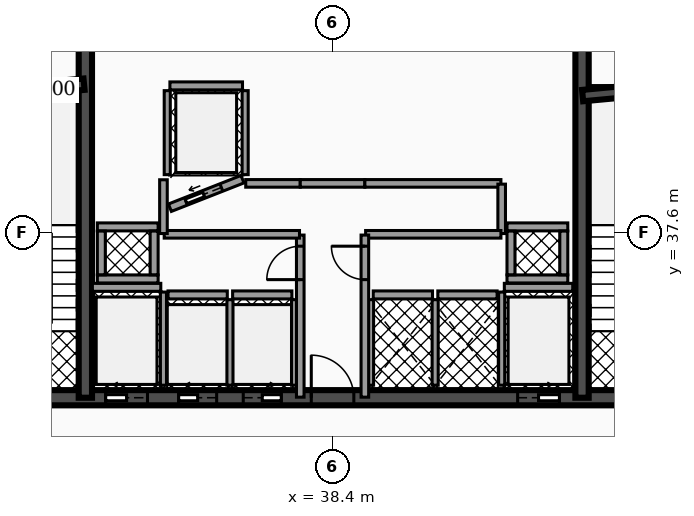
"""IFC4 building model, lengths in metres.
Left out: names, types, materials, properties, quantities, classifications, styles, units other than length and angle.
Written with IfcOpenShell. Run it as: python <this file> out.ifc"""

import sys

from ifc_helpers import new_model, si_unit, direction, frame, frame_2d, origin, place, context, subcontext, project, spatial, rectangle, extrude, element, fill, save


model = new_model("IFC4")
c1 = context("Model", 3, precision=1e-05, world=origin(), true_north=direction((0.0, 1.0)))
c2 = subcontext(c1, "Body", "Model", "MODEL_VIEW")
j1 = project(units=[si_unit("LENGTHUNIT", "METRE"), si_unit("PLANEANGLEUNIT", "RADIAN")], contexts=[c1])
p1 = place(None, origin())
s1 = spatial("IfcSite", under=j1, at=p1, CompositionType="ELEMENT")
p2 = place(p1, origin())
s2 = spatial("IfcBuilding", under=s1, at=p2, CompositionType="ELEMENT")
p3 = place(p2, frame((0.0, 0.0, 183.26)))
s3 = spatial("IfcBuildingStorey", under=s2, at=p3, CompositionType="ELEMENT", Elevation=183.26)
p4 = place(p3, frame((28.4, 33.25, 0.0), z_axis=(0.0, 0.0, 1.0), x_axis=(1.0, 0.0, 0.0)))
e1 = element("IfcWall", 1, at=p4, inside=s3, PredefinedType="SHEAR", context=c2, shape_type="SweptSolid", body=[
    extrude(rectangle(XDim=20.06, YDim=0.4, at=frame_2d((10.03, 0.0))), origin(), (0.0, 0.0, 1.0), 3.5),
])
p5 = place(p4, frame((4.03, 0.0, 0.0)))
e2 = element("IfcOpeningElement", 2, at=p5, cuts=e1, PredefinedType="OPENING", context=c2, shape_type="SweptSolid", body=[
    extrude(rectangle(XDim=1.1, YDim=2.15, at=frame_2d((0.55, 1.075))), frame((0.0, 0.21, 0.0), z_axis=(0.0, -1.0, 0.0), x_axis=(1.0, 0.0, 0.0)), (0.0, 0.0, 1.0), 0.42),
])
p6 = place(p4, frame((14.87, 0.0, 0.0)))
e3 = element("IfcOpeningElement", 3, at=p6, cuts=e1, PredefinedType="OPENING", context=c2, shape_type="SweptSolid", body=[
    extrude(rectangle(XDim=1.1, YDim=2.15, at=frame_2d((0.55, 1.075))), frame((0.0, 0.21, 0.0), z_axis=(0.0, -1.0, 0.0), x_axis=(1.0, 0.0, 0.0)), (0.0, 0.0, 1.0), 0.42),
])
p7 = place(p4, frame((5.95, 0.0, 0.0)))
e4 = element("IfcOpeningElement", 4, at=p7, cuts=e1, PredefinedType="OPENING", context=c2, shape_type="SweptSolid", body=[
    extrude(rectangle(XDim=1.0, YDim=2.1, at=frame_2d((0.5, 1.05))), frame((0.0, 0.21, 0.0), z_axis=(0.0, -1.0, 0.0), x_axis=(1.0, 0.0, 0.0)), (0.0, 0.0, 1.0), 0.42),
])
p8 = place(p4, frame((7.65, 0.0, 0.0)))
e5 = element("IfcOpeningElement", 5, at=p8, cuts=e1, PredefinedType="OPENING", context=c2, shape_type="SweptSolid", body=[
    extrude(rectangle(XDim=1.0, YDim=2.1, at=frame_2d((0.5, 1.05))), frame((0.0, 0.21, 0.0), z_axis=(0.0, -1.0, 0.0), x_axis=(1.0, 0.0, 0.0)), (0.0, 0.0, 1.0), 0.42),
])
p9 = place(p4, frame((1.31, 0.0, 0.0)))
e6 = element("IfcOpeningElement", 6, at=p9, cuts=e1, PredefinedType="OPENING", context=c2, shape_type="SweptSolid", body=[
    extrude(rectangle(XDim=1.1, YDim=2.2, at=frame_2d((0.55, 1.1))), frame((0.0, 0.21, 0.0), z_axis=(0.0, -1.0, 0.0), x_axis=(1.0, 0.0, 0.0)), (0.0, 0.0, 1.0), 0.42),
])
p10 = place(p4, frame((9.44, 0.0, 0.0)))
e7 = element("IfcOpeningElement", 7, at=p10, cuts=e1, PredefinedType="OPENING", context=c2, shape_type="SweptSolid", body=[
    extrude(rectangle(XDim=1.12, YDim=2.05, at=frame_2d((0.56, 1.025))), frame((0.0, 0.21, 0.0), z_axis=(0.0, -1.0, 0.0), x_axis=(1.0, 0.0, 0.0)), (0.0, 0.0, 1.0), 0.42),
])
p11 = place(p4, frame((17.65, 0.0, 0.0)))
e8 = element("IfcOpeningElement", 8, at=p11, cuts=e1, PredefinedType="OPENING", context=c2, shape_type="SweptSolid", body=[
    extrude(rectangle(XDim=1.1, YDim=2.2, at=frame_2d((0.55, 1.1))), frame((0.0, 0.21, 0.0), z_axis=(0.0, -1.0, 0.0), x_axis=(1.0, 0.0, 0.0)), (0.0, 0.0, 1.0), 0.42),
])
for number, where, z_axis, x_axis in (
    (9, (31.895, 33.25, 0.0), (0.0, 0.0, 1.0), (0.0, 1.0, 0.0)),
    (10, (44.965, 33.25, 0.0), (0.0, 0.0, 1.0), (0.0, 1.0, 0.0)),
):
    element("IfcWall", number, at=place(p3, frame(where, z_axis=z_axis, x_axis=x_axis)), inside=s3, PredefinedType="SHEAR", context=c2, shape_type="SweptSolid", body=[
        extrude(rectangle(XDim=10.2, YDim=0.35, at=frame_2d((5.1, 0.0))), origin(), (0.0, 0.0, 1.0), 3.5),
    ])
p12 = place(p3, frame((28.64, 41.2, 0.0), z_axis=(0.0, 0.0, 1.0), x_axis=(0.995687118776, 0.092774789157, 0.0)))
e11 = element("IfcWall", 11, at=p12, inside=s3, PredefinedType="SHEAR", context=c2, shape_type="SweptSolid", body=[
    extrude(rectangle(XDim=3.234, YDim=0.3, at=frame_2d((1.617, 0.0))), origin(), (0.0, 0.0, 1.0), 3.5),
])
p13 = place(p3, frame((44.98, 41.2, 0.0), z_axis=(0.0, 0.0, 1.0), x_axis=(0.995686468965, 0.09278176286, 0.0)))
e12 = element("IfcWall", 12, at=p13, inside=s3, PredefinedType="SHEAR", context=c2, shape_type="SweptSolid", body=[
    extrude(rectangle(XDim=3.234, YDim=0.3, at=frame_2d((1.617, 0.0))), origin(), (0.0, 0.0, 1.0), 3.5),
])
p14 = place(p3, frame((32.08, 36.155, 0.0), z_axis=(0.0, 0.0, 1.0), x_axis=(1.0, 0.0, 0.0)))
e13 = element("IfcWall", 13, at=p14, inside=s3, PredefinedType="SOLIDWALL", context=c2, shape_type="SweptSolid", body=[
    extrude(rectangle(XDim=1.8, YDim=0.21, at=frame_2d((0.9, 0.0))), origin(), (0.0, 0.0, 1.0), 2.472),
])
p15 = place(p3, frame((33.95, 33.58, 0.0), z_axis=(0.0, 0.0, 1.0), x_axis=(0.0, 1.0, 0.0)))
e14 = element("IfcWall", 14, at=p15, inside=s3, PredefinedType="SOLIDWALL", context=c2, shape_type="SweptSolid", body=[
    extrude(rectangle(XDim=2.45, YDim=0.16, at=frame_2d((1.225, 0.0))), origin(), (0.0, 0.0, 1.0), 2.472),
])
p16 = place(p3, frame((42.92, 36.155, 0.0), z_axis=(0.0, 0.0, 1.0), x_axis=(1.0, 0.0, 0.0)))
e15 = element("IfcWall", 15, at=p16, inside=s3, PredefinedType="SOLIDWALL", context=c2, shape_type="SweptSolid", body=[
    extrude(rectangle(XDim=1.8, YDim=0.21, at=frame_2d((0.9, 0.0))), origin(), (0.0, 0.0, 1.0), 2.472),
])
p17 = place(p3, frame((42.85, 33.58, 0.0), z_axis=(0.0, 0.0, 1.0), x_axis=(0.0, 1.0, 0.0)))
e16 = element("IfcWall", 16, at=p17, inside=s3, PredefinedType="SOLIDWALL", context=c2, shape_type="SweptSolid", body=[
    extrude(rectangle(XDim=2.45, YDim=0.16, at=frame_2d((1.225, 0.0))), origin(), (0.0, 0.0, 1.0), 2.472),
])
p18 = place(p3, frame((34.07, 35.955, 0.0), z_axis=(0.0, 0.0, 1.0), x_axis=(1.0, 0.0, 0.0)))
e17 = element("IfcWall", 17, at=p18, inside=s3, PredefinedType="SOLIDWALL", context=c2, shape_type="SweptSolid", body=[
    extrude(rectangle(XDim=1.56, YDim=0.21, at=frame_2d((0.78, 0.0))), origin(), (0.0, 0.0, 1.0), 2.472),
])
p19 = place(p3, frame((35.7, 33.58, 0.0), z_axis=(0.0, 0.0, 1.0), x_axis=(0.0, 1.0, 0.0)))
e18 = element("IfcWall", 18, at=p19, inside=s3, PredefinedType="SOLIDWALL", context=c2, shape_type="SweptSolid", body=[
    extrude(rectangle(XDim=2.25, YDim=0.16, at=frame_2d((1.125, 0.0))), origin(), (0.0, 0.0, 1.0), 2.472),
])
p20 = place(p3, frame((35.77, 35.955, 0.0), z_axis=(0.0, 0.0, 1.0), x_axis=(1.0, 0.0, 0.0)))
e19 = element("IfcWall", 19, at=p20, inside=s3, PredefinedType="SOLIDWALL", context=c2, shape_type="SweptSolid", body=[
    extrude(rectangle(XDim=1.56, YDim=0.21, at=frame_2d((0.78, 0.0))), origin(), (0.0, 0.0, 1.0), 2.472),
])
p21 = place(p3, frame((37.4, 33.58, 0.0), z_axis=(0.0, 0.0, 1.0), x_axis=(0.0, 1.0, 0.0)))
e20 = element("IfcWall", 20, at=p21, inside=s3, PredefinedType="SOLIDWALL", context=c2, shape_type="SweptSolid", body=[
    extrude(rectangle(XDim=2.25, YDim=0.16, at=frame_2d((1.125, 0.0))), origin(), (0.0, 0.0, 1.0), 2.472),
])
p22 = place(p3, frame((34.12, 38.25, 0.0), z_axis=(0.0, 0.0, 1.0), x_axis=(0.930804993012, 0.36551616241, 0.0)))
e21 = element("IfcWall", 21, at=p22, inside=s3, PredefinedType="SOLIDWALL", context=c2, shape_type="SweptSolid", body=[
    extrude(rectangle(XDim=2.052, YDim=0.21, at=frame_2d((1.026, 0.0))), origin(), (0.0, 0.0, 1.0), 2.472),
])
p23 = place(p22, frame((0.455, 0.0, 0.0)))
e22 = element("IfcOpeningElement", 22, at=p23, cuts=e21, PredefinedType="OPENING", context=c2, shape_type="SweptSolid", body=[
    extrude(rectangle(XDim=1.0, YDim=2.1, at=frame_2d((0.5, 1.05))), frame((0.0, 0.115, 0.0), z_axis=(0.0, -1.0, 0.0), x_axis=(1.0, 0.0, 0.0)), (0.0, 0.0, 1.0), 0.23),
])
p24 = place(p3, frame((34.12, 41.455, 0.0), z_axis=(0.0, 0.0, 1.0), x_axis=(1.0, 0.0, 0.0)))
e23 = element("IfcWall", 23, at=p24, inside=s3, PredefinedType="SOLIDWALL", context=c2, shape_type="SweptSolid", body=[
    extrude(rectangle(XDim=1.91, YDim=0.21, at=frame_2d((0.955, 0.0))), origin(), (0.0, 0.0, 1.0), 2.472),
])
for number, where, z_axis, x_axis in (
    (24, (34.05, 39.12, 0.0), (0.0, 0.0, 1.0), (0.0, 1.0, 0.0)),
    (25, (36.1, 39.12, 0.0), (0.0, 0.0, 1.0), (0.0, 1.0, 0.0)),
):
    element("IfcWall", number, at=place(p3, frame(where, z_axis=z_axis, x_axis=x_axis)), inside=s3, PredefinedType="SOLIDWALL", context=c2, shape_type="SweptSolid", body=[
        extrude(rectangle(XDim=2.21, YDim=0.16, at=frame_2d((1.105, 0.0))), origin(), (0.0, 0.0, 1.0), 2.472),
    ])
p25 = place(p3, frame((39.47, 35.955, 0.0), z_axis=(0.0, 0.0, 1.0), x_axis=(1.0, 0.0, 0.0)))
e26 = element("IfcWall", 26, at=p25, inside=s3, PredefinedType="SOLIDWALL", context=c2, shape_type="SweptSolid", body=[
    extrude(rectangle(XDim=1.56, YDim=0.21, at=frame_2d((0.78, 0.0))), origin(), (0.0, 0.0, 1.0), 2.472),
])
for number, where, z_axis, x_axis in (
    (27, (39.4, 33.58, 0.0), (0.0, 0.0, 1.0), (0.0, 1.0, 0.0)),
    (28, (41.1, 33.58, 0.0), (0.0, 0.0, 1.0), (0.0, 1.0, 0.0)),
):
    element("IfcWall", number, at=place(p3, frame(where, z_axis=z_axis, x_axis=x_axis)), inside=s3, PredefinedType="SOLIDWALL", context=c2, shape_type="SweptSolid", body=[
        extrude(rectangle(XDim=2.25, YDim=0.16, at=frame_2d((1.125, 0.0))), origin(), (0.0, 0.0, 1.0), 2.472),
    ])
p26 = place(p3, frame((41.17, 35.955, 0.0), z_axis=(0.0, 0.0, 1.0), x_axis=(1.0, 0.0, 0.0)))
e29 = element("IfcWall", 29, at=p26, inside=s3, PredefinedType="SOLIDWALL", context=c2, shape_type="SweptSolid", body=[
    extrude(rectangle(XDim=1.56, YDim=0.21, at=frame_2d((0.78, 0.0))), origin(), (0.0, 0.0, 1.0), 2.472),
])
for number, where, z_axis, x_axis in (
    (30, (32.21, 36.375, 0.0), (0.0, 0.0, 1.0), (1.0, 0.0, 0.0)),
    (31, (32.21, 37.745, 0.0), (0.0, 0.0, 1.0), (1.0, 0.0, 0.0)),
):
    element("IfcWall", number, at=place(p3, frame(where, z_axis=z_axis, x_axis=x_axis)), inside=s3, PredefinedType="SOLIDWALL", context=c2, shape_type="SweptSolid", body=[
        extrude(rectangle(XDim=1.6, YDim=0.21, at=frame_2d((0.8, 0.0))), origin(), (0.0, 0.0, 1.0), 3.5),
    ])
for number, where, z_axis, x_axis in (
    (32, (32.315, 36.485, 0.0), (0.0, 0.0, 1.0), (0.0, 1.0, 0.0)),
    (33, (33.705, 36.485, 0.0), (0.0, 0.0, 1.0), (0.0, 1.0, 0.0)),
):
    element("IfcWall", number, at=place(p3, frame(where, z_axis=z_axis, x_axis=x_axis)), inside=s3, PredefinedType="SOLIDWALL", context=c2, shape_type="SweptSolid", body=[
        extrude(rectangle(XDim=1.15, YDim=0.21, at=frame_2d((0.575, 0.0))), origin(), (0.0, 0.0, 1.0), 3.5),
    ])
for number, where, z_axis, x_axis in (
    (34, (42.99, 36.375, 0.0), (0.0, 0.0, 1.0), (1.0, 0.0, 0.0)),
    (35, (42.99, 37.745, 0.0), (0.0, 0.0, 1.0), (1.0, 0.0, 0.0)),
):
    element("IfcWall", number, at=place(p3, frame(where, z_axis=z_axis, x_axis=x_axis)), inside=s3, PredefinedType="SOLIDWALL", context=c2, shape_type="SweptSolid", body=[
        extrude(rectangle(XDim=1.6, YDim=0.21, at=frame_2d((0.8, 0.0))), origin(), (0.0, 0.0, 1.0), 3.5),
    ])
for number, where, z_axis, x_axis in (
    (36, (43.095, 36.485, 0.0), (0.0, 0.0, 1.0), (0.0, 1.0, 0.0)),
    (37, (44.485, 36.485, 0.0), (0.0, 0.0, 1.0), (0.0, 1.0, 0.0)),
):
    element("IfcWall", number, at=place(p3, frame(where, z_axis=z_axis, x_axis=x_axis)), inside=s3, PredefinedType="SOLIDWALL", context=c2, shape_type="SweptSolid", body=[
        extrude(rectangle(XDim=1.15, YDim=0.21, at=frame_2d((0.575, 0.0))), origin(), (0.0, 0.0, 1.0), 3.5),
    ])
p27 = place(p3, frame((37.55, 33.265, 0.0), z_axis=(0.0, 0.0, 1.0), x_axis=(0.0, 1.0, 0.0)))
e38 = element("IfcWall", 38, at=p27, inside=s3, PredefinedType="PARTITIONING", context=c2, shape_type="SweptSolid", body=[
    extrude(rectangle(XDim=4.265, YDim=0.2, at=frame_2d((2.133, 0.0))), origin(), (0.0, 0.0, 1.0), 2.457),
])
p28 = place(p27, frame((3.093, 0.0, 0.0)))
e39 = element("IfcOpeningElement", 39, at=p28, cuts=e38, PredefinedType="OPENING", context=c2, shape_type="SweptSolid", body=[
    extrude(rectangle(XDim=0.88, YDim=2.05, at=frame_2d((0.44, 1.025))), frame((0.0, 0.11, 0.0), z_axis=(0.0, -1.0, 0.0), x_axis=(1.0, 0.0, 0.0)), (0.0, 0.0, 1.0), 0.22),
])
p29 = place(p3, frame((33.97, 37.55, 0.0), z_axis=(0.0, 0.0, 1.0), x_axis=(1.0, 0.0, 0.0)))
e40 = element("IfcWall", 40, at=p29, inside=s3, PredefinedType="PARTITIONING", context=c2, shape_type="SweptSolid", body=[
    extrude(rectangle(XDim=3.56, YDim=0.2, at=frame_2d((1.78, 0.0))), origin(), (0.0, 0.0, 1.0), 2.457),
])
p30 = place(p3, frame((33.95, 37.57, 0.0), z_axis=(0.0, 0.0, 1.0), x_axis=(0.0, 1.0, 0.0)))
e41 = element("IfcWall", 41, at=p30, inside=s3, PredefinedType="PARTITIONING", context=c2, shape_type="SweptSolid", body=[
    extrude(rectangle(XDim=1.415, YDim=0.2, at=frame_2d((0.708, 0.0))), origin(), (0.0, 0.0, 1.0), 2.457),
])
p31 = place(p3, frame((36.115, 38.89, 0.0), z_axis=(0.0, 0.0, 1.0), x_axis=(1.0, 0.0, 0.0)))
e42 = element("IfcWall", 42, at=p31, inside=s3, PredefinedType="PARTITIONING", context=c2, shape_type="SweptSolid", body=[
    extrude(rectangle(XDim=1.435, YDim=0.2, at=frame_2d((0.718, 0.0))), origin(), (0.0, 0.0, 1.0), 2.457),
])
p32 = place(p3, frame((37.55, 38.89, 0.0), z_axis=(0.0, 0.0, 1.0), x_axis=(1.0, 0.0, 0.0)))
e43 = element("IfcWall", 43, at=p32, inside=s3, PredefinedType="PARTITIONING", context=c2, shape_type="SweptSolid", body=[
    extrude(rectangle(XDim=1.7, YDim=0.2, at=frame_2d((0.85, 0.0))), origin(), (0.0, 0.0, 1.0), 2.457),
])
p33 = place(p3, frame((39.25, 38.89, 0.0), z_axis=(0.0, 0.0, 1.0), x_axis=(1.0, 0.0, 0.0)))
e44 = element("IfcWall", 44, at=p33, inside=s3, PredefinedType="PARTITIONING", context=c2, shape_type="SweptSolid", body=[
    extrude(rectangle(XDim=3.58, YDim=0.2, at=frame_2d((1.79, 0.0))), origin(), (0.0, 0.0, 1.0), 2.457),
])
p34 = place(p3, frame((42.85, 37.57, 0.0), z_axis=(0.0, 0.0, 1.0), x_axis=(0.0, 1.0, 0.0)))
e45 = element("IfcWall", 45, at=p34, inside=s3, PredefinedType="PARTITIONING", context=c2, shape_type="SweptSolid", body=[
    extrude(rectangle(XDim=1.3, YDim=0.2, at=frame_2d((0.65, 0.0))), origin(), (0.0, 0.0, 1.0), 2.457),
])
p35 = place(p3, frame((39.27, 37.55, 0.0), z_axis=(0.0, 0.0, 1.0), x_axis=(1.0, 0.0, 0.0)))
e46 = element("IfcWall", 46, at=p35, inside=s3, PredefinedType="PARTITIONING", context=c2, shape_type="SweptSolid", body=[
    extrude(rectangle(XDim=3.56, YDim=0.2, at=frame_2d((1.78, 0.0))), origin(), (0.0, 0.0, 1.0), 2.457),
])
p36 = place(p3, frame((39.25, 33.265, 0.0), z_axis=(0.0, 0.0, 1.0), x_axis=(0.0, 1.0, 0.0)))
e47 = element("IfcWall", 47, at=p36, inside=s3, PredefinedType="PARTITIONING", context=c2, shape_type="SweptSolid", body=[
    extrude(rectangle(XDim=4.265, YDim=0.2, at=frame_2d((2.133, 0.0))), origin(), (0.0, 0.0, 1.0), 2.457),
])
p37 = place(p36, frame((3.093, 0.0, 0.0)))
e48 = element("IfcOpeningElement", 48, at=p37, cuts=e47, PredefinedType="OPENING", context=c2, shape_type="SweptSolid", body=[
    extrude(rectangle(XDim=0.88, YDim=2.05, at=frame_2d((0.44, 1.025))), frame((0.0, 0.11, 0.0), z_axis=(0.0, -1.0, 0.0), x_axis=(1.0, 0.0, 0.0)), (0.0, 0.0, 1.0), 0.22),
])
p38 = place(p5, origin())
e49 = element("IfcDoor", 49, at=p38, inside=s3, OperationType="SLIDING_TO_LEFT", PredefinedType="DOOR", context=c2, shape_type="SweptSolid", body=[
    extrude(rectangle(XDim=1.1, YDim=2.15, at=frame_2d((0.55, 1.075))), frame((0.0, 0.025, 0.0), z_axis=(0.0, -1.0, 0.0), x_axis=(1.0, 0.0, 0.0)), (0.0, 0.0, 1.0), 0.05),
])
fill(e2, e49)
p39 = place(p6, origin())
e50 = element("IfcDoor", 50, at=p39, inside=s3, OperationType="SLIDING_TO_RIGHT", PredefinedType="DOOR", context=c2, shape_type="SweptSolid", body=[
    extrude(rectangle(XDim=1.1, YDim=2.15, at=frame_2d((0.55, 1.075))), frame((0.0, 0.025, 0.0), z_axis=(0.0, -1.0, 0.0), x_axis=(1.0, 0.0, 0.0)), (0.0, 0.0, 1.0), 0.05),
])
fill(e3, e50)
p40 = place(p7, origin())
e51 = element("IfcDoor", 51, at=p40, inside=s3, OperationType="SLIDING_TO_LEFT", PredefinedType="DOOR", context=c2, shape_type="SweptSolid", body=[
    extrude(rectangle(XDim=1.0, YDim=2.1, at=frame_2d((0.5, 1.05))), frame((0.0, 0.025, 0.0), z_axis=(0.0, -1.0, 0.0), x_axis=(1.0, 0.0, 0.0)), (0.0, 0.0, 1.0), 0.05),
])
fill(e4, e51)
p41 = place(p8, origin())
e52 = element("IfcDoor", 52, at=p41, inside=s3, OperationType="SLIDING_TO_RIGHT", PredefinedType="DOOR", context=c2, shape_type="SweptSolid", body=[
    extrude(rectangle(XDim=1.0, YDim=2.1, at=frame_2d((0.5, 1.05))), frame((0.0, 0.025, 0.0), z_axis=(0.0, -1.0, 0.0), x_axis=(1.0, 0.0, 0.0)), (0.0, 0.0, 1.0), 0.05),
])
fill(e5, e52)
p42 = place(p23, origin())
e53 = element("IfcDoor", 53, at=p42, inside=s3, OperationType="SLIDING_TO_LEFT", PredefinedType="DOOR", context=c2, shape_type="SweptSolid", body=[
    extrude(rectangle(XDim=1.0, YDim=2.1, at=frame_2d((0.5, 1.05))), frame((0.0, 0.025, 0.0), z_axis=(0.0, -1.0, 0.0), x_axis=(1.0, 0.0, 0.0)), (0.0, 0.0, 1.0), 0.05),
])
fill(e22, e53)
p43 = place(p10, origin())
e54 = element("IfcDoor", 54, at=p43, inside=s3, OperationType="SINGLE_SWING_LEFT", PredefinedType="DOOR", context=c2, shape_type="SweptSolid", body=[
    extrude(rectangle(XDim=1.12, YDim=2.05, at=frame_2d((0.56, 1.025))), frame((0.0, 0.025, 0.0), z_axis=(0.0, -1.0, 0.0), x_axis=(1.0, 0.0, 0.0)), (0.0, 0.0, 1.0), 0.05),
])
fill(e7, e54)
p44 = place(p28, origin())
e55 = element("IfcDoor", 55, at=p44, inside=s3, OperationType="SINGLE_SWING_LEFT", PredefinedType="DOOR", context=c2, shape_type="SweptSolid", body=[
    extrude(rectangle(XDim=0.88, YDim=2.05, at=frame_2d((0.44, 1.025))), frame((0.0, 0.025, 0.0), z_axis=(0.0, -1.0, 0.0), x_axis=(1.0, 0.0, 0.0)), (0.0, 0.0, 1.0), 0.05),
])
fill(e39, e55)
p45 = place(p37, origin())
e56 = element("IfcDoor", 56, at=p45, inside=s3, OperationType="SINGLE_SWING_RIGHT", PredefinedType="DOOR", context=c2, shape_type="SweptSolid", body=[
    extrude(rectangle(XDim=0.88, YDim=2.05, at=frame_2d((0.44, 1.025))), frame((0.0, 0.025, 0.0), z_axis=(0.0, -1.0, 0.0), x_axis=(1.0, 0.0, 0.0)), (0.0, 0.0, 1.0), 0.05),
])
fill(e48, e56)
save(model, sys.argv[1])
